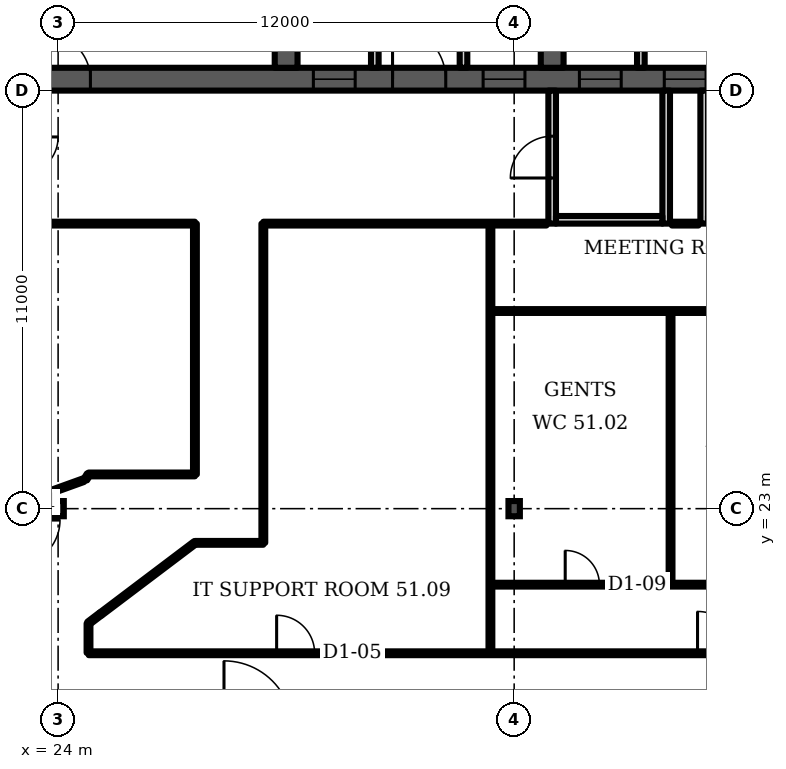
"""IFC4 building model, lengths in metres.
Left out: names, types, materials, properties, quantities, classifications, styles, units other than length and angle.
Written with IfcOpenShell. Run it as: python <this file> out.ifc"""

import sys

from ifc_helpers import new_model, si_unit, direction, frame, frame_2d, origin, origin_2d, place, context, subcontext, project, spatial, polyline, rectangle, i_section, outline, extrude, element, fill, save


model = new_model("IFC4")
c1 = context("Model", 3, precision=1e-05, world=origin(), true_north=direction((0.0, 1.0)))
c2 = subcontext(c1, "Body", "Model", "MODEL_VIEW")
j1 = project(units=[si_unit("LENGTHUNIT", "METRE"), si_unit("PLANEANGLEUNIT", "RADIAN")], contexts=[c1])
p1 = place(None, origin())
s1 = spatial("IfcSite", under=j1, at=p1, CompositionType="ELEMENT")
p2 = place(p1, origin())
s2 = spatial("IfcBuilding", under=s1, at=p2, CompositionType="ELEMENT")
p3 = place(p2, frame((0.0, 0.0, 207.1)))
s3 = spatial("IfcBuildingStorey", under=s2, at=p3, CompositionType="ELEMENT", Elevation=207.1)
p4 = place(p3, frame((23.0, 34.3, 0.0), z_axis=(0.0, 0.0, 1.0), x_axis=(1.0, 0.0, 0.0)))
e1 = element("IfcWall", 1, at=p4, inside=s3, PredefinedType="SHEAR", context=c2, shape_type="SweptSolid", body=[
    extrude(rectangle(XDim=35.0, YDim=0.6, at=frame_2d((17.5, 0.0))), origin(), (0.0, 0.0, 1.0), 3.6),
])
p5 = place(p4, frame((0.65, 0.0, 0.0)))
e2 = element("IfcOpeningElement", 2, at=p5, cuts=e1, PredefinedType="OPENING", context=c2, shape_type="SweptSolid", body=[
    extrude(rectangle(XDim=1.2, YDim=2.1, at=frame_2d((0.6, 1.05))), frame((0.0, 0.31, 0.0), z_axis=(0.0, -1.0, 0.0), x_axis=(1.0, 0.0, 0.0)), (0.0, 0.0, 1.0), 0.62),
])
p6 = place(p4, frame((7.717, 0.0, 0.0)))
e3 = element("IfcOpeningElement", 3, at=p6, cuts=e1, PredefinedType="OPENING", context=c2, shape_type="SweptSolid", body=[
    extrude(rectangle(XDim=1.1, YDim=2.1, at=frame_2d((0.55, 1.05))), frame((0.0, 0.31, 0.0), z_axis=(0.0, -1.0, 0.0), x_axis=(1.0, 0.0, 0.0)), (0.0, 0.0, 1.0), 0.62),
])
p7 = place(p4, frame((12.183, 0.0, 0.0)))
e4 = element("IfcOpeningElement", 4, at=p7, cuts=e1, PredefinedType="OPENING", context=c2, shape_type="SweptSolid", body=[
    extrude(rectangle(XDim=1.1, YDim=2.1, at=frame_2d((0.55, 1.05))), frame((0.0, 0.31, 0.0), z_axis=(0.0, -1.0, 0.0), x_axis=(1.0, 0.0, 0.0)), (0.0, 0.0, 1.0), 0.62),
])
p8 = place(p4, frame((9.8, 0.0, 0.0)))
e5 = element("IfcOpeningElement", 5, at=p8, cuts=e1, PredefinedType="OPENING", context=c2, shape_type="SweptSolid", body=[
    extrude(rectangle(XDim=1.4, YDim=2.1, at=frame_2d((0.7, 1.05))), frame((0.0, 0.31, 0.0), z_axis=(0.0, -1.0, 0.0), x_axis=(1.0, 0.0, 0.0)), (0.0, 0.0, 1.0), 0.62),
])
p9 = place(p4, frame((14.717, 0.0, 0.0)))
e6 = element("IfcOpeningElement", 6, at=p9, cuts=e1, PredefinedType="OPENING", context=c2, shape_type="SweptSolid", body=[
    extrude(rectangle(XDim=1.1, YDim=2.1, at=frame_2d((0.55, 1.05))), frame((0.0, 0.31, 0.0), z_axis=(0.0, -1.0, 0.0), x_axis=(1.0, 0.0, 0.0)), (0.0, 0.0, 1.0), 0.62),
])
p10 = place(p4, frame((16.95, 0.0, 0.0)))
e7 = element("IfcOpeningElement", 7, at=p10, cuts=e1, PredefinedType="OPENING", context=c2, shape_type="SweptSolid", body=[
    extrude(rectangle(XDim=1.1, YDim=2.1, at=frame_2d((0.55, 1.05))), frame((0.0, 0.31, 0.0), z_axis=(0.0, -1.0, 0.0), x_axis=(1.0, 0.0, 0.0)), (0.0, 0.0, 1.0), 0.62),
])
p11 = place(p4, frame((19.183, 0.0, 0.0)))
e8 = element("IfcOpeningElement", 8, at=p11, cuts=e1, PredefinedType="OPENING", context=c2, shape_type="SweptSolid", body=[
    extrude(rectangle(XDim=1.1, YDim=2.1, at=frame_2d((0.55, 1.05))), frame((0.0, 0.31, 0.0), z_axis=(0.0, -1.0, 0.0), x_axis=(1.0, 0.0, 0.0)), (0.0, 0.0, 1.0), 0.62),
])
p12 = place(p4, frame((26.15, 0.0, 0.0)))
e9 = element("IfcOpeningElement", 9, at=p12, cuts=e1, PredefinedType="OPENING", context=c2, shape_type="SweptSolid", body=[
    extrude(rectangle(XDim=1.2, YDim=2.1, at=frame_2d((0.6, 1.05))), frame((0.0, 0.31, 0.0), z_axis=(0.0, -1.0, 0.0), x_axis=(1.0, 0.0, 0.0)), (0.0, 0.0, 1.0), 0.62),
])
p13 = place(p4, frame((28.767, 0.0, 0.0)))
e10 = element("IfcOpeningElement", 10, at=p13, cuts=e1, PredefinedType="OPENING", context=c2, shape_type="SweptSolid", body=[
    extrude(rectangle(XDim=1.0, YDim=2.1, at=frame_2d((0.5, 1.05))), frame((0.0, 0.31, 0.0), z_axis=(0.0, -1.0, 0.0), x_axis=(1.0, 0.0, 0.0)), (0.0, 0.0, 1.0), 0.62),
])
p14 = place(p4, frame((33.083, 0.0, 0.0)))
e11 = element("IfcOpeningElement", 11, at=p14, cuts=e1, PredefinedType="OPENING", context=c2, shape_type="SweptSolid", body=[
    extrude(rectangle(XDim=1.0, YDim=2.1, at=frame_2d((0.5, 1.05))), frame((0.0, 0.31, 0.0), z_axis=(0.0, -1.0, 0.0), x_axis=(1.0, 0.0, 0.0)), (0.0, 0.0, 1.0), 0.62),
])
p15 = place(p4, frame((30.8, 0.0, 0.0)))
e12 = element("IfcOpeningElement", 12, at=p15, cuts=e1, PredefinedType="OPENING", context=c2, shape_type="SweptSolid", body=[
    extrude(rectangle(XDim=1.4, YDim=2.1, at=frame_2d((0.7, 1.05))), frame((0.0, 0.31, 0.0), z_axis=(0.0, -1.0, 0.0), x_axis=(1.0, 0.0, 0.0)), (0.0, 0.0, 1.0), 0.62),
])
p16 = place(p3, frame((30.0, 34.6, 0.0), z_axis=(0.0, 0.0, 1.0), x_axis=(0.0, 1.0, 0.0)))
e13 = element("IfcWall", 13, at=p16, inside=s3, PredefinedType="SHEAR", context=c2, shape_type="SweptSolid", body=[
    extrude(rectangle(XDim=14.171, YDim=0.6, at=frame_2d((7.085, 0.0))), origin(), (0.0, 0.0, 1.0), 3.6),
])
p17 = place(p16, frame((3.8, 0.0, 0.0)))
e14 = element("IfcOpeningElement", 14, at=p17, cuts=e13, PredefinedType="OPENING", context=c2, shape_type="SweptSolid", body=[
    extrude(rectangle(XDim=1.1, YDim=2.1, at=frame_2d((0.55, 1.05))), frame((0.0, 0.31, 0.0), z_axis=(0.0, -1.0, 0.0), x_axis=(1.0, 0.0, 0.0)), (0.0, 0.0, 1.0), 0.62),
])
p18 = place(p3, frame((37.0, 34.6, 0.0), z_axis=(0.0, 0.0, 1.0), x_axis=(0.0, 1.0, 0.0)))
e15 = element("IfcWall", 15, at=p18, inside=s3, PredefinedType="SHEAR", context=c2, shape_type="SweptSolid", body=[
    extrude(rectangle(XDim=14.784, YDim=0.6, at=frame_2d((7.392, 0.0))), origin(), (0.0, 0.0, 1.0), 3.6),
])
p19 = place(p18, frame((11.302, 0.0, 0.0)))
e16 = element("IfcOpeningElement", 16, at=p19, cuts=e15, PredefinedType="OPENING", context=c2, shape_type="SweptSolid", body=[
    extrude(rectangle(XDim=1.0, YDim=2.1, at=frame_2d((0.5, 1.05))), frame((0.0, 0.31, 0.0), z_axis=(0.0, -1.0, 0.0), x_axis=(1.0, 0.0, 0.0)), (0.0, 0.0, 1.0), 0.62),
])
p20 = place(p18, frame((3.8, 0.0, 0.0)))
e17 = element("IfcOpeningElement", 17, at=p20, cuts=e15, PredefinedType="OPENING", context=c2, shape_type="SweptSolid", body=[
    extrude(rectangle(XDim=1.1, YDim=2.1, at=frame_2d((0.55, 1.05))), frame((0.0, 0.31, 0.0), z_axis=(0.0, -1.0, 0.0), x_axis=(1.0, 0.0, 0.0)), (0.0, 0.0, 1.0), 0.62),
])
for number, where, z_axis, x_axis in (
    (18, (24.0, 23.0, 0.0), (0.0, 0.0, 1.0), (1.0, 0.0, 0.0)),
    (19, (36.0, 23.0, 0.0), (0.0, 0.0, 1.0), (1.0, 0.0, 0.0)),
):
    element("IfcColumn", number, at=place(p3, frame(where, z_axis=z_axis, x_axis=x_axis)), inside=s3, PredefinedType="COLUMN", context=c2, shape_type="SweptSolid", body=[
        extrude(i_section(OverallWidth=0.3, OverallDepth=0.4, WebThickness=0.013, FlangeThickness=0.024, FilletRadius=0.027, at=origin_2d()), origin(), (0.0, 0.0, 1.0), 3.6),
    ])
p21 = place(p3, frame((0.0, 0.0, -0.0)))
e20 = element("IfcWall", 20, at=p21, inside=s3, PredefinedType="PARTITIONING", context=c2, shape_type="SweptSolid", body=[
    extrude(outline(polyline([(32.233, 37.45), (30.3, 37.45), (30.3, 37.65), (32.233, 37.65), (32.433, 37.65), (32.433, 34.6), (32.233, 34.6), (32.233, 37.45)])), origin(), (0.0, 0.0, 1.0), 3.2),
])
p22 = place(p3, frame((0.0, 0.0, -0.0)))
e21 = element("IfcWall", 21, at=p22, inside=s3, PredefinedType="PARTITIONING", context=c2, shape_type="SweptSolid", body=[
    extrude(outline(polyline([(34.567, 37.65), (34.767, 37.65), (36.7, 37.65), (36.7, 37.45), (34.767, 37.45), (34.767, 34.6), (34.567, 34.6), (34.567, 37.65)])), origin(), (0.0, 0.0, 1.0), 3.2),
])
p23 = place(p3, frame((0.0, 0.0, -0.0)))
e22 = element("IfcWall", 22, at=p23, inside=s3, PredefinedType="PARTITIONING", context=c2, shape_type="SweptSolid", body=[
    extrude(outline(polyline([(41.567, 37.1), (39.433, 37.1), (39.433, 34.6), (39.233, 34.6), (39.233, 37.45), (37.3, 37.45), (37.3, 37.65), (39.233, 37.65), (39.433, 37.65), (39.433, 37.3), (41.567, 37.3), (41.567, 37.35), (41.767, 37.35), (43.7, 37.35), (43.7, 37.15), (41.767, 37.15), (41.767, 34.6), (41.567, 34.6), (41.567, 37.1)])), origin(), (0.0, 0.0, 1.0), 3.2),
])
p24 = place(p3, frame((37.0, 30.5, 0.0), z_axis=(0.0, 0.0, 1.0), x_axis=(0.0, 1.0, 0.0)))
e23 = element("IfcWall", 23, at=p24, inside=s3, PredefinedType="PARTITIONING", context=c2, shape_type="SweptSolid", body=[
    extrude(rectangle(XDim=3.5, YDim=0.2, at=frame_2d((1.75, 0.0))), origin(), (0.0, 0.0, 1.0), 3.2),
])
p25 = place(p24, frame((1.2, 0.0, 0.0)))
e24 = element("IfcOpeningElement", 24, at=p25, cuts=e23, PredefinedType="OPENING", context=c2, shape_type="SweptSolid", body=[
    extrude(rectangle(XDim=1.1, YDim=2.1, at=frame_2d((0.55, 1.05))), frame((0.0, 0.11, 0.0), z_axis=(0.0, -1.0, 0.0), x_axis=(1.0, 0.0, 0.0)), (0.0, 0.0, 1.0), 0.22),
])
p26 = place(p3, frame((40.0, 30.5, 0.0), z_axis=(0.0, 0.0, 1.0), x_axis=(0.0, 1.0, 0.0)))
e25 = element("IfcWall", 25, at=p26, inside=s3, PredefinedType="PARTITIONING", context=c2, shape_type="SweptSolid", body=[
    extrude(rectangle(XDim=3.5, YDim=0.2, at=frame_2d((1.75, 0.0))), origin(), (0.0, 0.0, 1.0), 3.2),
])
p27 = place(p3, frame((37.1, 30.6, 0.0), z_axis=(0.0, 0.0, 1.0), x_axis=(1.0, 0.0, 0.0)))
e26 = element("IfcWall", 26, at=p27, inside=s3, PredefinedType="PARTITIONING", context=c2, shape_type="SweptSolid", body=[
    extrude(rectangle(XDim=2.8, YDim=0.2, at=frame_2d((1.4, 0.0))), origin(), (0.0, 0.0, 1.0), 3.2),
])
p28 = place(p3, frame((41.0, 30.5, 0.0), z_axis=(0.0, 0.0, 1.0), x_axis=(0.0, 1.0, 0.0)))
e27 = element("IfcWall", 27, at=p28, inside=s3, PredefinedType="PARTITIONING", context=c2, shape_type="SweptSolid", body=[
    extrude(rectangle(XDim=3.5, YDim=0.2, at=frame_2d((1.75, 0.0))), origin(), (0.0, 0.0, 1.0), 3.2),
])
p29 = place(p3, frame((23.0, 30.5, 0.0), z_axis=(0.0, 0.0, 1.0), x_axis=(1.0, 0.0, 0.0)))
e28 = element("IfcWall", 28, at=p29, inside=s3, PredefinedType="PARTITIONING", context=c2, shape_type="SweptSolid", body=[
    extrude(rectangle(XDim=4.6, YDim=0.1, at=frame_2d((2.3, 0.0))), origin(), (0.0, 0.0, 1.0), 3.2),
])
p30 = place(p3, frame((23.285, 23.25, 0.0), z_axis=(0.0, 0.0, 1.0), x_axis=(0.940585, 0.339559, 0.0)))
e29 = element("IfcWall", 29, at=p30, inside=s3, PredefinedType="PARTITIONING", context=c2, shape_type="SweptSolid", body=[
    extrude(rectangle(XDim=1.472, YDim=0.1, at=frame_2d((0.736, 0.0))), origin(), (0.0, 0.0, 1.0), 3.2),
])
p31 = place(p3, frame((24.72, 23.77, 0.0), z_axis=(0.0, 0.0, 1.0), x_axis=(0.524813, 0.851221, 0.0)))
e30 = element("IfcWall", 30, at=p31, inside=s3, PredefinedType="PARTITIONING", context=c2, shape_type="SweptSolid", body=[
    extrude(rectangle(XDim=0.153, YDim=0.1, at=frame_2d((0.076, 0.0))), origin(), (0.0, 0.0, 1.0), 3.2),
])
p32 = place(p3, frame((24.8, 19.205, 0.0), z_axis=(0.0, 0.0, 1.0), x_axis=(0.0, 1.0, 0.0)))
e31 = element("IfcWall", 31, at=p32, inside=s3, PredefinedType="PARTITIONING", context=c2, shape_type="SweptSolid", body=[
    extrude(rectangle(XDim=0.775, YDim=0.1, at=frame_2d((0.387, 0.0))), origin(), (0.0, 0.0, 1.0), 3.2),
])
p33 = place(p3, frame((24.8, 19.985, 0.0), z_axis=(0.0, 0.0, 1.0), x_axis=(0.795388, 0.606098, 0.0)))
e32 = element("IfcWall", 32, at=p33, inside=s3, PredefinedType="PARTITIONING", context=c2, shape_type="SweptSolid", body=[
    extrude(rectangle(XDim=0.396, YDim=0.1, at=frame_2d((0.198, 0.0))), origin(), (0.0, 0.0, 1.0), 3.2),
])
p34 = place(p3, frame((24.8, 23.9, 0.0), z_axis=(0.0, 0.0, 1.0), x_axis=(1.0, 0.0, 0.0)))
e33 = element("IfcWall", 33, at=p34, inside=s3, PredefinedType="PARTITIONING", context=c2, shape_type="SweptSolid", body=[
    extrude(rectangle(XDim=2.8, YDim=0.1, at=frame_2d((1.4, 0.0))), origin(), (0.0, 0.0, 1.0), 3.2),
])
p35 = place(p3, frame((24.805, 19.195, 0.0), z_axis=(0.0, 0.0, 1.0), x_axis=(1.0, 0.0, 0.0)))
e34 = element("IfcWall", 34, at=p35, inside=s3, PredefinedType="PARTITIONING", context=c2, shape_type="SweptSolid", body=[
    extrude(rectangle(XDim=40.265, YDim=0.1, at=frame_2d((20.133, 0.0))), origin(), (0.0, 0.0, 1.0), 3.2),
])
p36 = place(p35, frame((4.945, 0.0, 0.0)))
e35 = element("IfcOpeningElement", 35, at=p36, cuts=e34, PredefinedType="OPENING", context=c2, shape_type="SweptSolid", body=[
    extrude(rectangle(XDim=1.0, YDim=2.1, at=frame_2d((0.5, 1.05))), frame((0.0, 0.06, 0.0), z_axis=(0.0, -1.0, 0.0), x_axis=(1.0, 0.0, 0.0)), (0.0, 0.0, 1.0), 0.12),
])
p37 = place(p35, frame((30.57, 0.0, 0.0)))
e36 = element("IfcOpeningElement", 36, at=p37, cuts=e34, PredefinedType="OPENING", context=c2, shape_type="SweptSolid", body=[
    extrude(rectangle(XDim=1.0, YDim=2.1, at=frame_2d((0.5, 1.05))), frame((0.0, 0.06, 0.0), z_axis=(0.0, -1.0, 0.0), x_axis=(1.0, 0.0, 0.0)), (0.0, 0.0, 1.0), 0.12),
])
p38 = place(p35, frame((16.02, 0.0, 0.0)))
e37 = element("IfcOpeningElement", 37, at=p38, cuts=e34, PredefinedType="OPENING", context=c2, shape_type="SweptSolid", body=[
    extrude(rectangle(XDim=1.1, YDim=2.1, at=frame_2d((0.55, 1.05))), frame((0.0, 0.06, 0.0), z_axis=(0.0, -1.0, 0.0), x_axis=(1.0, 0.0, 0.0)), (0.0, 0.0, 1.0), 0.12),
])
p39 = place(p3, frame((25.125, 20.23, 0.0), z_axis=(0.0, 0.0, 1.0), x_axis=(0.797858, 0.60284, 0.0)))
e38 = element("IfcWall", 38, at=p39, inside=s3, PredefinedType="PARTITIONING", context=c2, shape_type="SweptSolid", body=[
    extrude(rectangle(XDim=3.102, YDim=0.1, at=frame_2d((1.551, 0.0))), origin(), (0.0, 0.0, 1.0), 3.2),
])
p40 = place(p3, frame((27.6, 23.9, 0.0), z_axis=(0.0, 0.0, 1.0), x_axis=(0.0, 1.0, 0.0)))
e39 = element("IfcWall", 39, at=p40, inside=s3, PredefinedType="PARTITIONING", context=c2, shape_type="SweptSolid", body=[
    extrude(rectangle(XDim=6.6, YDim=0.1, at=frame_2d((3.3, 0.0))), origin(), (0.0, 0.0, 1.0), 3.2),
])
p41 = place(p3, frame((27.6, 22.1, 0.0), z_axis=(0.0, 0.0, 1.0), x_axis=(1.0, 0.0, 0.0)))
e40 = element("IfcWall", 40, at=p41, inside=s3, PredefinedType="PARTITIONING", context=c2, shape_type="SweptSolid", body=[
    extrude(rectangle(XDim=1.8, YDim=0.1, at=frame_2d((0.9, 0.0))), origin(), (0.0, 0.0, 1.0), 3.2),
])
p42 = place(p3, frame((29.4, 22.1, 0.0), z_axis=(0.0, 0.0, 1.0), x_axis=(0.0, 1.0, 0.0)))
e41 = element("IfcWall", 41, at=p42, inside=s3, PredefinedType="PARTITIONING", context=c2, shape_type="SweptSolid", body=[
    extrude(rectangle(XDim=8.4, YDim=0.1, at=frame_2d((4.2, 0.0))), origin(), (0.0, 0.0, 1.0), 3.2),
])
p43 = place(p3, frame((29.4, 30.5, 0.0), z_axis=(0.0, 0.0, 1.0), x_axis=(1.0, 0.0, 0.0)))
e42 = element("IfcWall", 42, at=p43, inside=s3, PredefinedType="PARTITIONING", context=c2, shape_type="SweptSolid", body=[
    extrude(rectangle(XDim=7.45, YDim=0.1, at=frame_2d((3.725, 0.0))), origin(), (0.0, 0.0, 1.0), 3.2),
])
p44 = place(p3, frame((35.375, 19.205, 0.0), z_axis=(0.0, 0.0, 1.0), x_axis=(0.0, 1.0, 0.0)))
e43 = element("IfcWall", 43, at=p44, inside=s3, PredefinedType="PARTITIONING", context=c2, shape_type="SweptSolid", body=[
    extrude(rectangle(XDim=11.295, YDim=0.1, at=frame_2d((5.647, 0.0))), origin(), (0.0, 0.0, 1.0), 3.2),
])
p45 = place(p3, frame((35.375, 21.0, 0.0), z_axis=(0.0, 0.0, 1.0), x_axis=(1.0, 0.0, 0.0)))
e44 = element("IfcWall", 44, at=p45, inside=s3, PredefinedType="PARTITIONING", context=c2, shape_type="SweptSolid", body=[
    extrude(rectangle(XDim=12.0, YDim=0.1, at=frame_2d((6.0, 0.0))), origin(), (0.0, 0.0, 1.0), 3.2),
])
p46 = place(p45, frame((1.968, 0.0, 0.0)))
e45 = element("IfcOpeningElement", 45, at=p46, cuts=e44, PredefinedType="OPENING", context=c2, shape_type="SweptSolid", body=[
    extrude(rectangle(XDim=0.9, YDim=2.1, at=frame_2d((0.45, 1.05))), frame((0.0, 0.06, 0.0), z_axis=(0.0, -1.0, 0.0), x_axis=(1.0, 0.0, 0.0)), (0.0, 0.0, 1.0), 0.12),
])
p47 = place(p45, frame((6.47, 0.0, 0.0)))
e46 = element("IfcOpeningElement", 46, at=p47, cuts=e44, PredefinedType="OPENING", context=c2, shape_type="SweptSolid", body=[
    extrude(rectangle(XDim=0.9, YDim=2.1, at=frame_2d((0.45, 1.05))), frame((0.0, 0.06, 0.0), z_axis=(0.0, -1.0, 0.0), x_axis=(1.0, 0.0, 0.0)), (0.0, 0.0, 1.0), 0.12),
])
p48 = place(p45, frame((10.1, 0.0, 0.0)))
e47 = element("IfcOpeningElement", 47, at=p48, cuts=e44, PredefinedType="OPENING", context=c2, shape_type="SweptSolid", body=[
    extrude(rectangle(XDim=1.0, YDim=2.1, at=frame_2d((0.5, 1.05))), frame((0.0, 0.06, 0.0), z_axis=(0.0, -1.0, 0.0), x_axis=(1.0, 0.0, 0.0)), (0.0, 0.0, 1.0), 0.12),
])
p49 = place(p3, frame((35.375, 28.2, 0.0), z_axis=(0.0, 0.0, 1.0), x_axis=(1.0, 0.0, 0.0)))
e48 = element("IfcWall", 48, at=p49, inside=s3, PredefinedType="PARTITIONING", context=c2, shape_type="SweptSolid", body=[
    extrude(rectangle(XDim=12.0, YDim=0.1, at=frame_2d((6.0, 0.0))), origin(), (0.0, 0.0, 1.0), 3.2),
])
p50 = place(p3, frame((40.115, 21.0, 0.0), z_axis=(0.0, 0.0, 1.0), x_axis=(0.0, 1.0, 0.0)))
e49 = element("IfcWall", 49, at=p50, inside=s3, PredefinedType="PARTITIONING", context=c2, shape_type="SweptSolid", body=[
    extrude(rectangle(XDim=7.2, YDim=0.1, at=frame_2d((3.6, 0.0))), origin(), (0.0, 0.0, 1.0), 3.2),
])
p51 = place(p3, frame((40.15, 30.5, 0.0), z_axis=(0.0, 0.0, 1.0), x_axis=(1.0, 0.0, 0.0)))
e50 = element("IfcWall", 50, at=p51, inside=s3, PredefinedType="PARTITIONING", context=c2, shape_type="SweptSolid", body=[
    extrude(rectangle(XDim=0.7, YDim=0.1, at=frame_2d((0.35, 0.0))), origin(), (0.0, 0.0, 1.0), 3.2),
])
p52 = place(p5, origin())
e51 = element("IfcDoor", 51, at=p52, inside=s3, OperationType="SINGLE_SWING_LEFT", PredefinedType="DOOR", context=c2, shape_type="SweptSolid", body=[
    extrude(rectangle(XDim=1.2, YDim=2.1, at=frame_2d((0.6, 1.05))), frame((0.0, 0.025, 0.0), z_axis=(0.0, -1.0, 0.0), x_axis=(1.0, 0.0, 0.0)), (0.0, 0.0, 1.0), 0.05),
])
fill(e2, e51)
p53 = place(p6, origin())
e52 = element("IfcDoor", 52, at=p53, inside=s3, OperationType="DOUBLE_DOOR_SLIDING", PredefinedType="DOOR", context=c2, shape_type="SweptSolid", body=[
    extrude(rectangle(XDim=1.1, YDim=2.1, at=frame_2d((0.55, 1.05))), frame((0.0, 0.025, 0.0), z_axis=(0.0, -1.0, 0.0), x_axis=(1.0, 0.0, 0.0)), (0.0, 0.0, 1.0), 0.05),
])
fill(e3, e52)
p54 = place(p7, origin())
e53 = element("IfcDoor", 53, at=p54, inside=s3, OperationType="DOUBLE_DOOR_SLIDING", PredefinedType="DOOR", context=c2, shape_type="SweptSolid", body=[
    extrude(rectangle(XDim=1.1, YDim=2.1, at=frame_2d((0.55, 1.05))), frame((0.0, 0.025, 0.0), z_axis=(0.0, -1.0, 0.0), x_axis=(1.0, 0.0, 0.0)), (0.0, 0.0, 1.0), 0.05),
])
fill(e4, e53)
p55 = place(p8, origin())
e54 = element("IfcDoor", 54, at=p55, inside=s3, OperationType="DOUBLE_DOOR_SINGLE_SWING", PredefinedType="DOOR", context=c2, shape_type="SweptSolid", body=[
    extrude(rectangle(XDim=1.4, YDim=2.1, at=frame_2d((0.7, 1.05))), frame((0.0, 0.025, 0.0), z_axis=(0.0, -1.0, 0.0), x_axis=(1.0, 0.0, 0.0)), (0.0, 0.0, 1.0), 0.05),
])
fill(e5, e54)
p56 = place(p9, origin())
e55 = element("IfcDoor", 55, at=p56, inside=s3, OperationType="DOUBLE_DOOR_SLIDING", PredefinedType="DOOR", context=c2, shape_type="SweptSolid", body=[
    extrude(rectangle(XDim=1.1, YDim=2.1, at=frame_2d((0.55, 1.05))), frame((0.0, 0.025, 0.0), z_axis=(0.0, -1.0, 0.0), x_axis=(1.0, 0.0, 0.0)), (0.0, 0.0, 1.0), 0.05),
])
fill(e6, e55)
p57 = place(p10, origin())
e56 = element("IfcDoor", 56, at=p57, inside=s3, OperationType="DOUBLE_DOOR_SLIDING", PredefinedType="DOOR", context=c2, shape_type="SweptSolid", body=[
    extrude(rectangle(XDim=1.1, YDim=2.1, at=frame_2d((0.55, 1.05))), frame((0.0, 0.025, 0.0), z_axis=(0.0, -1.0, 0.0), x_axis=(1.0, 0.0, 0.0)), (0.0, 0.0, 1.0), 0.05),
])
fill(e7, e56)
p58 = place(p25, origin())
e57 = element("IfcDoor", 57, at=p58, inside=s3, OperationType="SINGLE_SWING_LEFT", PredefinedType="DOOR", context=c2, shape_type="SweptSolid", body=[
    extrude(rectangle(XDim=1.1, YDim=2.1, at=frame_2d((0.55, 1.05))), frame((0.0, 0.025, 0.0), z_axis=(0.0, -1.0, 0.0), x_axis=(1.0, 0.0, 0.0)), (0.0, 0.0, 1.0), 0.05),
])
fill(e24, e57)
p59 = place(p36, origin())
e58 = element("IfcDoor", 58, at=p59, inside=s3, OperationType="SINGLE_SWING_LEFT", PredefinedType="DOOR", context=c2, shape_type="SweptSolid", body=[
    extrude(rectangle(XDim=1.0, YDim=2.1, at=frame_2d((0.5, 1.05))), frame((0.0, 0.025, 0.0), z_axis=(0.0, -1.0, 0.0), x_axis=(1.0, 0.0, 0.0)), (0.0, 0.0, 1.0), 0.05),
])
fill(e35, e58)
p60 = place(p38, origin())
e59 = element("IfcDoor", 59, at=p60, inside=s3, OperationType="SINGLE_SWING_LEFT", PredefinedType="DOOR", context=c2, shape_type="SweptSolid", body=[
    extrude(rectangle(XDim=1.1, YDim=2.1, at=frame_2d((0.55, 1.05))), frame((0.0, 0.025, 0.0), z_axis=(0.0, -1.0, 0.0), x_axis=(1.0, 0.0, 0.0)), (0.0, 0.0, 1.0), 0.05),
])
fill(e37, e59)
p61 = place(p46, origin())
e60 = element("IfcDoor", 60, at=p61, inside=s3, OperationType="SINGLE_SWING_LEFT", PredefinedType="DOOR", context=c2, shape_type="SweptSolid", body=[
    extrude(rectangle(XDim=0.9, YDim=2.1, at=frame_2d((0.45, 1.05))), frame((0.0, 0.025, 0.0), z_axis=(0.0, -1.0, 0.0), x_axis=(1.0, 0.0, 0.0)), (0.0, 0.0, 1.0), 0.05),
])
fill(e45, e60)
save(model, sys.argv[1])
